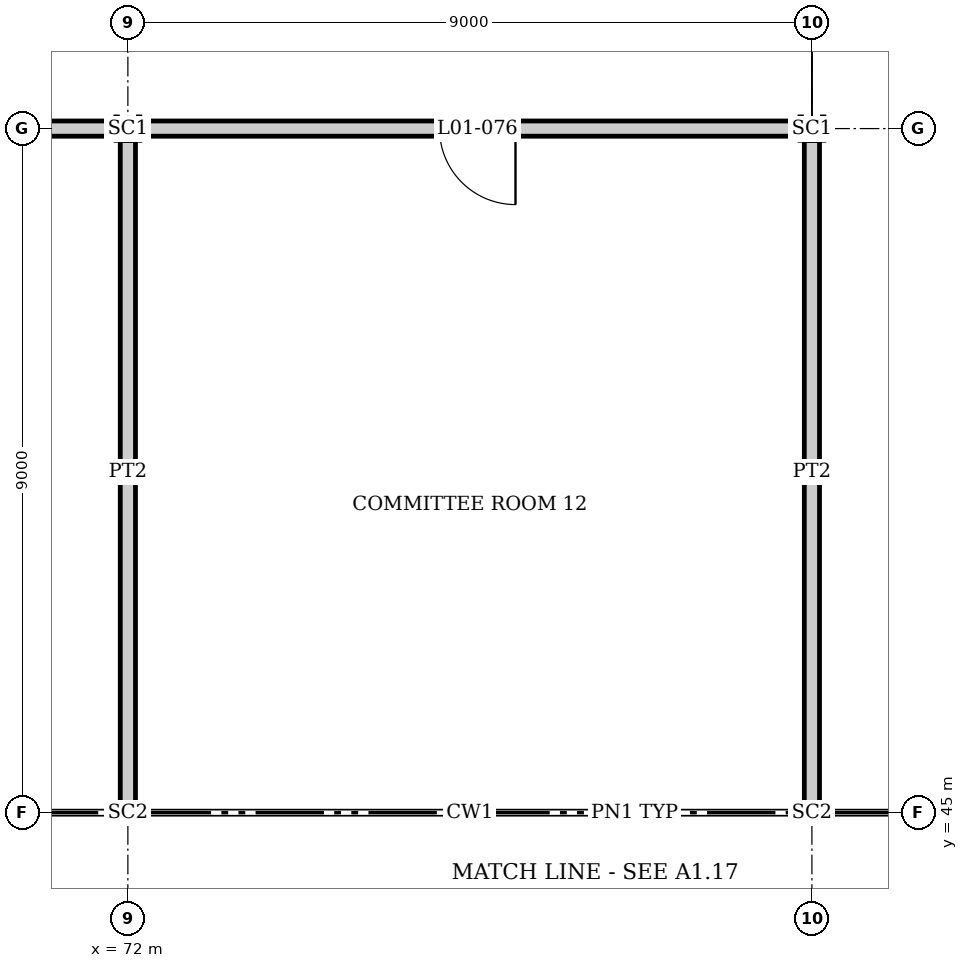
"""IFC4 building model, lengths in metres.
Left out: names, types, materials, properties, quantities, classifications, styles, units other than length and angle.
Written with IfcOpenShell. Run it as: python <this file> out.ifc"""

import sys

from ifc_helpers import new_model, si_unit, direction, frame, frame_2d, origin, origin_2d, place, context, subcontext, project, spatial, rectangle, i_section, extrude, element, fill, save


model = new_model("IFC4")
c1 = context("Model", 3, precision=1e-05, world=origin(), true_north=direction((0.0, 1.0)))
c2 = subcontext(c1, "Body", "Model", "MODEL_VIEW")
j1 = project(units=[si_unit("LENGTHUNIT", "METRE"), si_unit("PLANEANGLEUNIT", "RADIAN")], contexts=[c1])
p1 = place(None, origin())
s1 = spatial("IfcSite", under=j1, at=p1, CompositionType="ELEMENT")
p2 = place(p1, origin())
s2 = spatial("IfcBuilding", under=s1, at=p2, CompositionType="ELEMENT")
p3 = place(p2, frame((0.0, 0.0, 6.0)))
s3 = spatial("IfcBuildingStorey", under=s2, at=p3, CompositionType="ELEMENT", Elevation=6.0)
p4 = place(p3, frame((72.0, 45.0, 0.0), z_axis=(0.0, 0.0, 1.0), x_axis=(0.0, 1.0, 0.0)))
e1 = element("IfcColumn", 1, at=p4, inside=s3, PredefinedType="COLUMN", context=c2, shape_type="SweptSolid", body=[
    extrude(i_section(OverallWidth=0.256, OverallDepth=0.26, WebThickness=0.01, FlangeThickness=0.017, at=origin_2d()), origin(), (0.0, 0.0, 1.0), 4.5),
])
p5 = place(p3, frame((72.0, 54.0, 0.0), z_axis=(0.0, 0.0, 1.0), x_axis=(0.0, 1.0, 0.0)))
e2 = element("IfcColumn", 2, at=p5, inside=s3, PredefinedType="COLUMN", context=c2, shape_type="SweptSolid", body=[
    extrude(i_section(OverallWidth=0.307, OverallDepth=0.315, WebThickness=0.012, FlangeThickness=0.019, at=origin_2d()), origin(), (0.0, 0.0, 1.0), 4.5),
])
p6 = place(p3, frame((81.0, 45.0, 0.0), z_axis=(0.0, 0.0, 1.0), x_axis=(0.0, 1.0, 0.0)))
e3 = element("IfcColumn", 3, at=p6, inside=s3, PredefinedType="COLUMN", context=c2, shape_type="SweptSolid", body=[
    extrude(i_section(OverallWidth=0.256, OverallDepth=0.26, WebThickness=0.01, FlangeThickness=0.017, at=origin_2d()), origin(), (0.0, 0.0, 1.0), 4.5),
])
p7 = place(p3, frame((81.0, 54.0, 0.0), z_axis=(0.0, 0.0, 1.0), x_axis=(0.0, 1.0, 0.0)))
e4 = element("IfcColumn", 4, at=p7, inside=s3, PredefinedType="COLUMN", context=c2, shape_type="SweptSolid", body=[
    extrude(i_section(OverallWidth=0.307, OverallDepth=0.315, WebThickness=0.012, FlangeThickness=0.019, at=origin_2d()), origin(), (0.0, 0.0, 1.0), 4.5),
])
p8 = place(p3, frame((63.0, 54.0, 0.0), z_axis=(0.0, 0.0, 1.0), x_axis=(1.0, 0.0, 0.0)))
e5 = element("IfcWall", 5, at=p8, inside=s3, PredefinedType="PARTITIONING", context=c2, shape_type="SweptSolid", body=[
    extrude(rectangle(XDim=8.843, YDim=0.2, at=frame_2d((4.421, 0.0))), origin(), (0.0, 0.0, 1.0), 3.822),
])
p9 = place(p8, frame((4.1, 0.0, 0.0)))
e6 = element("IfcOpeningElement", 6, at=p9, cuts=e5, PredefinedType="OPENING", context=c2, shape_type="SweptSolid", body=[
    extrude(rectangle(XDim=1.0, YDim=2.1, at=frame_2d((0.5, 1.05))), frame((0.0, 0.11, 0.0), z_axis=(0.0, -1.0, 0.0), x_axis=(1.0, 0.0, 0.0)), (0.0, 0.0, 1.0), 0.22),
])
p10 = place(p3, frame((72.157, 54.0, 0.0), z_axis=(0.0, 0.0, 1.0), x_axis=(1.0, 0.0, 0.0)))
e7 = element("IfcWall", 7, at=p10, inside=s3, PredefinedType="PARTITIONING", context=c2, shape_type="SweptSolid", body=[
    extrude(rectangle(XDim=8.685, YDim=0.2, at=frame_2d((4.343, 0.0))), origin(), (0.0, 0.0, 1.0), 3.822),
])
p11 = place(p10, frame((3.942, 0.0, 0.0)))
e8 = element("IfcOpeningElement", 8, at=p11, cuts=e7, PredefinedType="OPENING", context=c2, shape_type="SweptSolid", body=[
    extrude(rectangle(XDim=1.0, YDim=2.1, at=frame_2d((0.5, 1.05))), frame((0.0, 0.11, 0.0), z_axis=(0.0, -1.0, 0.0), x_axis=(1.0, 0.0, 0.0)), (0.0, 0.0, 1.0), 0.22),
])
for number, where, z_axis, x_axis in (
    (9, (72.0, 45.13, 0.0), (0.0, 0.0, 1.0), (0.0, 1.0, 0.0)),
    (10, (81.0, 45.13, 0.0), (0.0, 0.0, 1.0), (0.0, 1.0, 0.0)),
):
    element("IfcWall", number, at=place(p3, frame(where, z_axis=z_axis, x_axis=x_axis)), inside=s3, PredefinedType="PARTITIONING", context=c2, shape_type="SweptSolid", body=[
        extrude(rectangle(XDim=8.713, YDim=0.2, at=frame_2d((4.356, 0.0))), origin(), (0.0, 0.0, 1.0), 3.947),
    ])
p12 = place(p11, frame((1.0, 0.0, 0.0), z_axis=(0.0, 0.0, 1.0), x_axis=(-1.0, 0.0, 0.0)))
e11 = element("IfcDoor", 11, at=p12, inside=s3, OperationType="SINGLE_SWING_LEFT", PredefinedType="DOOR", context=c2, shape_type="SweptSolid", body=[
    extrude(rectangle(XDim=1.0, YDim=2.1, at=frame_2d((0.5, 1.05))), frame((0.0, 0.025, 0.0), z_axis=(0.0, -1.0, 0.0), x_axis=(1.0, 0.0, 0.0)), (0.0, 0.0, 1.0), 0.05),
])
fill(e8, e11)
save(model, sys.argv[1])
